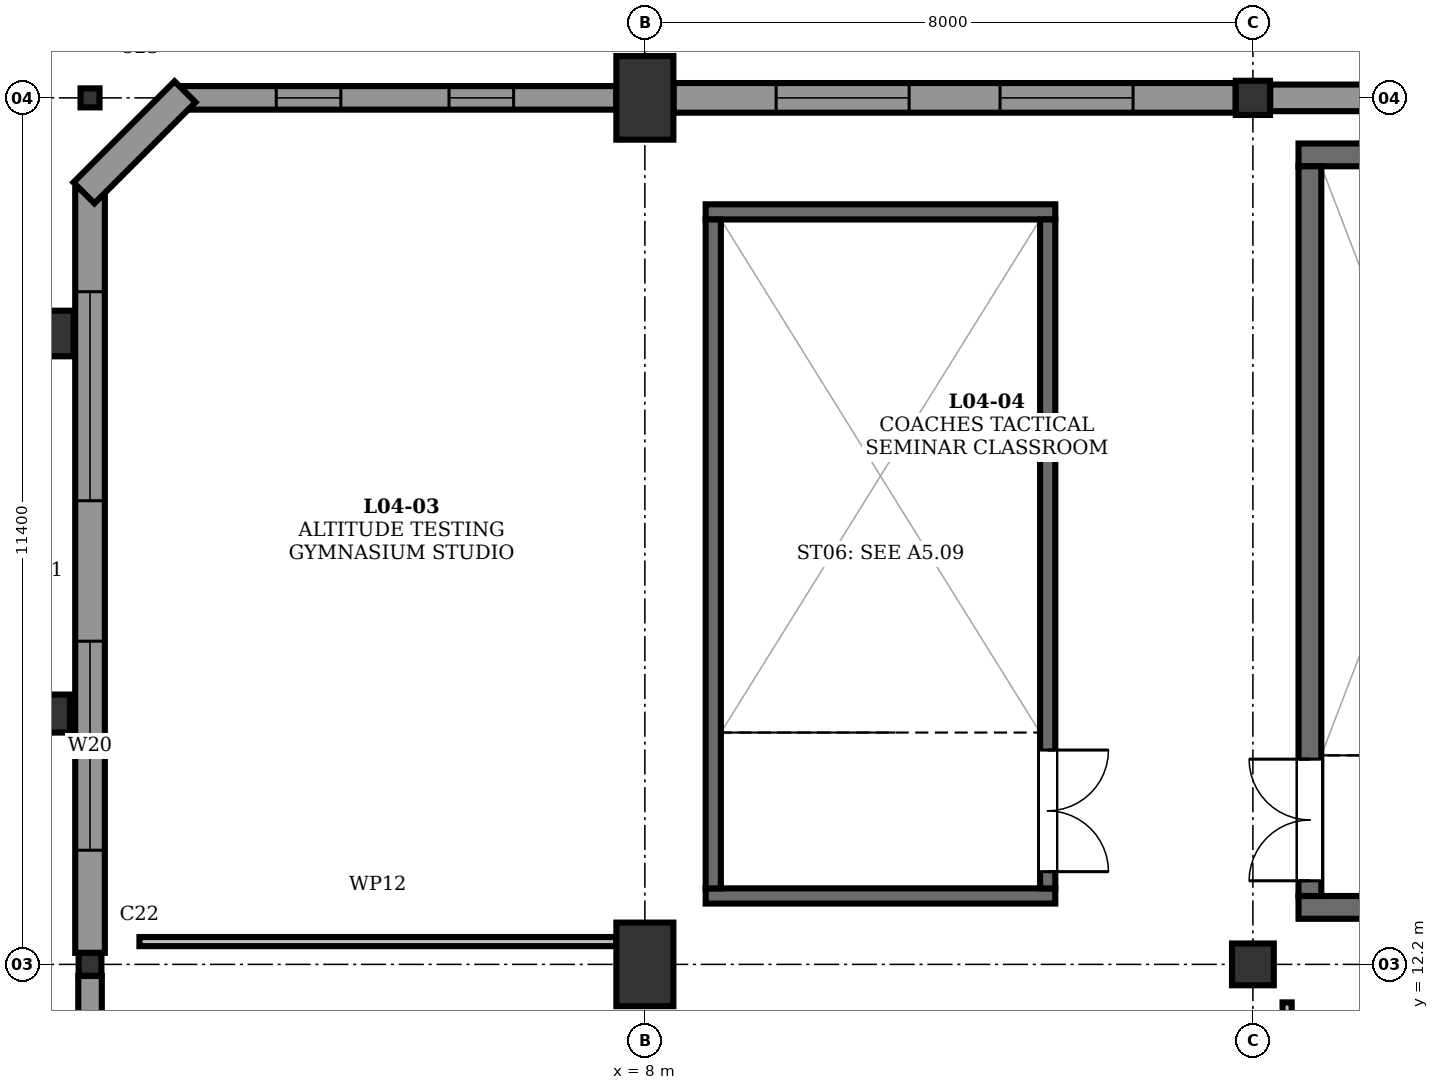
"""IFC4 building model, lengths in metres.
Left out: names, types, materials, properties, quantities, classifications, styles, units other than length and angle.
Written with IfcOpenShell. Run it as: python <this file> out.ifc"""

import sys

from ifc_helpers import new_model, si_unit, direction, frame, frame_2d, origin, origin_2d, place, context, subcontext, project, spatial, rectangle, hollow_rectangle, extrude, element, fill, save


model = new_model("IFC4")
c1 = context("Model", 3, precision=1e-05, world=origin(), true_north=direction((0.0, 1.0)))
c2 = subcontext(c1, "Body", "Model", "MODEL_VIEW")
j1 = project(units=[si_unit("LENGTHUNIT", "METRE"), si_unit("PLANEANGLEUNIT", "RADIAN")], contexts=[c1])
p1 = place(None, origin())
s1 = spatial("IfcSite", under=j1, at=p1, CompositionType="ELEMENT")
p2 = place(p1, origin())
s2 = spatial("IfcBuilding", under=s1, at=p2, CompositionType="ELEMENT")
p3 = place(p2, frame((0.0, 0.0, 19.2)))
s3 = spatial("IfcBuildingStorey", under=s2, at=p3, CompositionType="ELEMENT", Elevation=19.2)
p4 = place(p3, frame((0.7, 12.2, 0.0), z_axis=(0.0, 0.0, 1.0), x_axis=(1.0, 0.0, 0.0)))
e1 = element("IfcColumn", 1, at=p4, inside=s3, PredefinedType="COLUMN", context=c2, shape_type="SweptSolid", body=[
    extrude(hollow_rectangle(XDim=0.3, YDim=0.3, WallThickness=0.012, at=origin_2d()), origin(), (0.0, 0.0, 1.0), 4.8),
])
p5 = place(p3, frame((0.7, 23.6, 0.0), z_axis=(0.0, 0.0, 1.0), x_axis=(1.0, 0.0, 0.0)))
e2 = element("IfcColumn", 2, at=p5, inside=s3, PredefinedType="COLUMN", context=c2, shape_type="SweptSolid", body=[
    extrude(hollow_rectangle(XDim=0.25, YDim=0.25, WallThickness=0.012, at=origin_2d()), origin(), (0.0, 0.0, 1.0), 4.8),
])
for number, where, z_axis, x_axis in (
    (3, (8.0, 12.2, 0.0), (0.0, 0.0, 1.0), (1.0, 0.0, 0.0)),
    (4, (8.0, 23.6, 0.0), (0.0, 0.0, 1.0), (1.0, 0.0, 0.0)),
):
    element("IfcColumn", number, at=place(p3, frame(where, z_axis=z_axis, x_axis=x_axis)), inside=s3, PredefinedType="COLUMN", context=c2, shape_type="SweptSolid", body=[
        extrude(rectangle(XDim=0.75, YDim=1.1, at=origin_2d()), origin(), (0.0, 0.0, 1.0), 4.8),
    ])
p6 = place(p3, frame((16.0, 12.2, 0.0), z_axis=(0.0, 0.0, 1.0), x_axis=(1.0, 0.0, 0.0)))
e5 = element("IfcColumn", 5, at=p6, inside=s3, PredefinedType="COLUMN", context=c2, shape_type="SweptSolid", body=[
    extrude(rectangle(XDim=0.55, YDim=0.55, at=origin_2d()), origin(), (0.0, 0.0, 1.0), 4.8),
])
p7 = place(p3, frame((16.0, 23.6, 0.0), z_axis=(0.0, 0.0, 1.0), x_axis=(1.0, 0.0, 0.0)))
e6 = element("IfcColumn", 6, at=p7, inside=s3, PredefinedType="COLUMN", context=c2, shape_type="SweptSolid", body=[
    extrude(rectangle(XDim=0.45, YDim=0.45, at=origin_2d()), origin(), (0.0, 0.0, 1.0), 4.8),
])
p8 = place(p3, frame((0.26, 15.5, 0.0), z_axis=(0.0, 0.0, 1.0), x_axis=(1.0, 0.0, 0.0)))
e7 = element("IfcColumn", 7, at=p8, inside=s3, PredefinedType="PILASTER", context=c2, shape_type="SweptSolid", body=[
    extrude(rectangle(XDim=0.35, YDim=0.5, at=origin_2d()), origin(), (0.0, 0.0, 1.0), 5.65),
])
p9 = place(p3, frame((0.26, 20.5, 0.0), z_axis=(0.0, 0.0, 1.0), x_axis=(1.0, 0.0, 0.0)))
e8 = element("IfcColumn", 8, at=p9, inside=s3, PredefinedType="PILASTER", context=c2, shape_type="SweptSolid", body=[
    extrude(rectangle(XDim=0.45, YDim=0.6, at=origin_2d()), origin(), (0.0, 0.0, 1.0), 5.65),
])
p10 = place(p3, frame((0.7, 1.8, 0.0), z_axis=(0.0, 0.0, 1.0), x_axis=(0.0, 1.0, 0.0)))
e9 = element("IfcWall", 9, at=p10, inside=s3, PredefinedType="STANDARD", context=c2, shape_type="SweptSolid", body=[
    extrude(rectangle(XDim=10.248, YDim=0.31, at=frame_2d((5.124, 0.0))), origin(), (0.0, 0.0, 1.0), 3.645),
])
p11 = place(p10, frame((1.35, 0.0, 0.75)))
e10 = element("IfcOpeningElement", 10, at=p11, cuts=e9, PredefinedType="OPENING", context=c2, shape_type="SweptSolid", body=[
    extrude(rectangle(XDim=0.75, YDim=2.35, at=frame_2d((0.375, 1.175))), frame((0.0, 0.167, 0.0), z_axis=(0.0, -1.0, 0.0), x_axis=(1.0, 0.0, 0.0)), (0.0, 0.0, 1.0), 0.334),
])
p12 = place(p10, frame((4.749, 0.0, 0.75)))
e11 = element("IfcOpeningElement", 11, at=p12, cuts=e9, PredefinedType="OPENING", context=c2, shape_type="SweptSolid", body=[
    extrude(rectangle(XDim=0.75, YDim=2.35, at=frame_2d((0.375, 1.175))), frame((0.0, 0.167, 0.0), z_axis=(0.0, -1.0, 0.0), x_axis=(1.0, 0.0, 0.0)), (0.0, 0.0, 1.0), 0.334),
])
p13 = place(p10, frame((8.148, 0.0, 0.75)))
e12 = element("IfcOpeningElement", 12, at=p13, cuts=e9, PredefinedType="OPENING", context=c2, shape_type="SweptSolid", body=[
    extrude(rectangle(XDim=0.75, YDim=2.35, at=frame_2d((0.375, 1.175))), frame((0.0, 0.167, 0.0), z_axis=(0.0, -1.0, 0.0), x_axis=(1.0, 0.0, 0.0)), (0.0, 0.0, 1.0), 0.334),
])
p14 = place(p3, frame((0.7, 12.352, 0.0), z_axis=(0.0, 0.0, 1.0), x_axis=(0.0, 1.0, 0.0)))
e13 = element("IfcWall", 13, at=p14, inside=s3, PredefinedType="STANDARD", context=c2, shape_type="SweptSolid", body=[
    extrude(rectangle(XDim=10.048, YDim=0.39, at=frame_2d((5.024, 0.0))), origin(), (0.0, 0.0, 1.0), 3.645),
])
p15 = place(p14, frame((1.35, 0.0, 0.75)))
e14 = element("IfcOpeningElement", 14, at=p15, cuts=e13, PredefinedType="OPENING", context=c2, shape_type="SweptSolid", body=[
    extrude(rectangle(XDim=2.75, YDim=2.35, at=frame_2d((1.375, 1.175))), frame((0.0, 0.207, 0.0), z_axis=(0.0, -1.0, 0.0), x_axis=(1.0, 0.0, 0.0)), (0.0, 0.0, 1.0), 0.414),
])
p16 = place(p14, frame((5.948, 0.0, 0.75)))
e15 = element("IfcOpeningElement", 15, at=p16, cuts=e13, PredefinedType="OPENING", context=c2, shape_type="SweptSolid", body=[
    extrude(rectangle(XDim=2.75, YDim=2.35, at=frame_2d((1.375, 1.175))), frame((0.0, 0.207, 0.0), z_axis=(0.0, -1.0, 0.0), x_axis=(1.0, 0.0, 0.0)), (0.0, 0.0, 1.0), 0.414),
])
p17 = place(p3, frame((1.8, 23.6, 0.0), z_axis=(0.0, 0.0, 1.0), x_axis=(1.0, 0.0, 0.0)))
e16 = element("IfcWall", 16, at=p17, inside=s3, PredefinedType="STANDARD", context=c2, shape_type="SweptSolid", body=[
    extrude(rectangle(XDim=5.823, YDim=0.31, at=frame_2d((2.912, 0.0))), origin(), (0.0, 0.0, 1.0), 3.645),
])
p18 = place(p17, frame((1.35, 0.0, 0.75)))
e17 = element("IfcOpeningElement", 17, at=p18, cuts=e16, PredefinedType="OPENING", context=c2, shape_type="SweptSolid", body=[
    extrude(rectangle(XDim=0.85, YDim=1.75, at=frame_2d((0.425, 0.875))), frame((0.0, 0.167, 0.0), z_axis=(0.0, -1.0, 0.0), x_axis=(1.0, 0.0, 0.0)), (0.0, 0.0, 1.0), 0.334),
])
p19 = place(p17, frame((3.623, 0.0, 0.75)))
e18 = element("IfcOpeningElement", 18, at=p19, cuts=e16, PredefinedType="OPENING", context=c2, shape_type="SweptSolid", body=[
    extrude(rectangle(XDim=0.85, YDim=1.75, at=frame_2d((0.425, 0.875))), frame((0.0, 0.167, 0.0), z_axis=(0.0, -1.0, 0.0), x_axis=(1.0, 0.0, 0.0)), (0.0, 0.0, 1.0), 0.334),
])
p20 = place(p3, frame((8.377, 23.6, 0.0), z_axis=(0.0, 0.0, 1.0), x_axis=(1.0, 0.0, 0.0)))
e19 = element("IfcWall", 19, at=p20, inside=s3, PredefinedType="STANDARD", context=c2, shape_type="SweptSolid", body=[
    extrude(rectangle(XDim=7.396, YDim=0.39, at=frame_2d((3.698, 0.0))), origin(), (0.0, 0.0, 1.0), 3.645),
])
p21 = place(p20, frame((1.35, 0.0, 0.75)))
e20 = element("IfcOpeningElement", 20, at=p21, cuts=e19, PredefinedType="OPENING", context=c2, shape_type="SweptSolid", body=[
    extrude(rectangle(XDim=1.75, YDim=1.75, at=frame_2d((0.875, 0.875))), frame((0.0, 0.207, 0.0), z_axis=(0.0, -1.0, 0.0), x_axis=(1.0, 0.0, 0.0)), (0.0, 0.0, 1.0), 0.414),
])
p22 = place(p20, frame((4.296, 0.0, 0.75)))
e21 = element("IfcOpeningElement", 21, at=p22, cuts=e19, PredefinedType="OPENING", context=c2, shape_type="SweptSolid", body=[
    extrude(rectangle(XDim=1.75, YDim=1.75, at=frame_2d((0.875, 0.875))), frame((0.0, 0.207, 0.0), z_axis=(0.0, -1.0, 0.0), x_axis=(1.0, 0.0, 0.0)), (0.0, 0.0, 1.0), 0.414),
])
p23 = place(p3, frame((16.227, 23.6, 0.0), z_axis=(0.0, 0.0, 1.0), x_axis=(1.0, 0.0, 0.0)))
e22 = element("IfcWall", 22, at=p23, inside=s3, PredefinedType="STANDARD", context=c2, shape_type="SweptSolid", body=[
    extrude(rectangle(XDim=7.396, YDim=0.35, at=frame_2d((3.698, 0.0))), origin(), (0.0, 0.0, 1.0), 3.645),
])
p24 = place(p23, frame((1.35, 0.0, 0.75)))
e23 = element("IfcOpeningElement", 23, at=p24, cuts=e22, PredefinedType="OPENING", context=c2, shape_type="SweptSolid", body=[
    extrude(rectangle(XDim=0.9, YDim=2.05, at=frame_2d((0.45, 1.025))), frame((0.0, 0.187, 0.0), z_axis=(0.0, -1.0, 0.0), x_axis=(1.0, 0.0, 0.0)), (0.0, 0.0, 1.0), 0.374),
])
p25 = place(p23, frame((3.248, 0.0, 0.75)))
e24 = element("IfcOpeningElement", 24, at=p25, cuts=e22, PredefinedType="OPENING", context=c2, shape_type="SweptSolid", body=[
    extrude(rectangle(XDim=0.9, YDim=2.05, at=frame_2d((0.45, 1.025))), frame((0.0, 0.187, 0.0), z_axis=(0.0, -1.0, 0.0), x_axis=(1.0, 0.0, 0.0)), (0.0, 0.0, 1.0), 0.374),
])
p26 = place(p23, frame((5.146, 0.0, 0.75)))
e25 = element("IfcOpeningElement", 25, at=p26, cuts=e22, PredefinedType="OPENING", context=c2, shape_type="SweptSolid", body=[
    extrude(rectangle(XDim=0.9, YDim=2.05, at=frame_2d((0.45, 1.025))), frame((0.0, 0.187, 0.0), z_axis=(0.0, -1.0, 0.0), x_axis=(1.0, 0.0, 0.0)), (0.0, 0.0, 1.0), 0.374),
])
p27 = place(p3, frame((0.62, 22.35, 0.0), z_axis=(0.0, 0.0, 1.0), x_axis=(0.707106781187, 0.707106781187, 0.0)))
e26 = element("IfcWall", 26, at=p27, inside=s3, PredefinedType="STANDARD", context=c2, shape_type="SweptSolid", body=[
    extrude(rectangle(XDim=1.881, YDim=0.39, at=frame_2d((0.94, 0.0))), origin(), (0.0, 0.0, 1.0), 3.645),
])
for number, where, z_axis, x_axis in (
    (27, (16.6, 12.95, 0.0), (0.0, 0.0, 1.0), (1.0, 0.0, 0.0)),
    (28, (16.6, 22.85, 0.0), (0.0, 0.0, 1.0), (1.0, 0.0, 0.0)),
):
    element("IfcWall", number, at=place(p3, frame(where, z_axis=z_axis, x_axis=x_axis)), inside=s3, PredefinedType="SHEAR", context=c2, shape_type="SweptSolid", body=[
        extrude(rectangle(XDim=6.8, YDim=0.3, at=frame_2d((3.4, 0.0))), origin(), (0.0, 0.0, 1.0), 4.56),
    ])
p28 = place(p3, frame((16.75, 13.1, 0.0), z_axis=(0.0, 0.0, 1.0), x_axis=(0.0, 1.0, 0.0)))
e29 = element("IfcWall", 29, at=p28, inside=s3, PredefinedType="SHEAR", context=c2, shape_type="SweptSolid", body=[
    extrude(rectangle(XDim=9.6, YDim=0.3, at=frame_2d((4.8, 0.0))), origin(), (0.0, 0.0, 1.0), 4.56),
])
p29 = place(p28, frame((0.2, 0.0, 0.0)))
e30 = element("IfcOpeningElement", 30, at=p29, cuts=e29, PredefinedType="OPENING", context=c2, shape_type="SweptSolid", body=[
    extrude(rectangle(XDim=1.6, YDim=2.2, at=frame_2d((0.8, 1.1))), frame((0.0, 0.162, 0.0), z_axis=(0.0, -1.0, 0.0), x_axis=(1.0, 0.0, 0.0)), (0.0, 0.0, 1.0), 0.324),
])
for number, where, z_axis, x_axis in (
    (31, (8.8, 13.1, 0.0), (0.0, 0.0, 1.0), (1.0, 0.0, 0.0)),
    (32, (8.8, 22.1, 0.0), (0.0, 0.0, 1.0), (1.0, 0.0, 0.0)),
):
    element("IfcWall", number, at=place(p3, frame(where, z_axis=z_axis, x_axis=x_axis)), inside=s3, PredefinedType="SOLIDWALL", context=c2, shape_type="SweptSolid", body=[
        extrude(rectangle(XDim=4.6, YDim=0.2, at=frame_2d((2.3, 0.0))), origin(), (0.0, 0.0, 1.0), 4.56),
    ])
p30 = place(p3, frame((8.9, 13.2, 0.0), z_axis=(0.0, 0.0, 1.0), x_axis=(0.0, 1.0, 0.0)))
e33 = element("IfcWall", 33, at=p30, inside=s3, PredefinedType="SOLIDWALL", context=c2, shape_type="SweptSolid", body=[
    extrude(rectangle(XDim=8.8, YDim=0.2, at=frame_2d((4.4, 0.0))), origin(), (0.0, 0.0, 1.0), 4.56),
])
p31 = place(p3, frame((13.3, 13.2, 0.0), z_axis=(0.0, 0.0, 1.0), x_axis=(0.0, 1.0, 0.0)))
e34 = element("IfcWall", 34, at=p31, inside=s3, PredefinedType="SOLIDWALL", context=c2, shape_type="SweptSolid", body=[
    extrude(rectangle(XDim=8.8, YDim=0.2, at=frame_2d((4.4, 0.0))), origin(), (0.0, 0.0, 1.0), 4.56),
])
p32 = place(p31, frame((0.22, 0.0, 0.0)))
e35 = element("IfcOpeningElement", 35, at=p32, cuts=e34, PredefinedType="OPENING", context=c2, shape_type="SweptSolid", body=[
    extrude(rectangle(XDim=1.6, YDim=2.2, at=frame_2d((0.8, 1.1))), frame((0.0, 0.112, 0.0), z_axis=(0.0, -1.0, 0.0), x_axis=(1.0, 0.0, 0.0)), (0.0, 0.0, 1.0), 0.224),
])
p33 = place(p3, frame((16.45, 8.95, 0.0), z_axis=(0.0, 0.0, 1.0), x_axis=(0.0, 1.0, 0.0)))
e36 = element("IfcWall", 36, at=p33, inside=s3, PredefinedType="PARTITIONING", context=c2, shape_type="SweptSolid", body=[
    extrude(rectangle(XDim=2.75, YDim=0.12, at=frame_2d((1.375, 0.0))), origin(), (0.0, 0.0, 1.0), 3.845),
])
p34 = place(p33, frame((0.438, 0.0, 0.0)))
e37 = element("IfcOpeningElement", 37, at=p34, cuts=e36, PredefinedType="OPENING", context=c2, shape_type="SweptSolid", body=[
    extrude(rectangle(XDim=1.05, YDim=2.15, at=frame_2d((0.525, 1.075))), frame((0.0, 0.072, 0.0), z_axis=(0.0, -1.0, 0.0), x_axis=(1.0, 0.0, 0.0)), (0.0, 0.0, 1.0), 0.144),
])
p35 = place(p3, frame((1.35, 12.5, 0.0), z_axis=(0.0, 0.0, 1.0), x_axis=(1.0, 0.0, 0.0)))
e38 = element("IfcWall", 38, at=p35, inside=s3, PredefinedType="PARTITIONING", context=c2, shape_type="SweptSolid", body=[
    extrude(rectangle(XDim=6.273, YDim=0.12, at=frame_2d((3.136, 0.0))), origin(), (0.0, 0.0, 1.0), 3.645),
])
p36 = place(p15, origin())
e39 = element("IfcWindow", 39, at=p36, inside=s3, PartitioningType="TRIPLE_PANEL_VERTICAL", PredefinedType="WINDOW", context=c2, shape_type="SweptSolid", body=[
    extrude(rectangle(XDim=2.75, YDim=2.35, at=frame_2d((1.375, 1.175))), frame((0.0, 0.08, 0.0), z_axis=(0.0, -1.0, 0.0), x_axis=(1.0, 0.0, 0.0)), (0.0, 0.0, 1.0), 0.06),
])
fill(e14, e39)
p37 = place(p16, origin())
e40 = element("IfcWindow", 40, at=p37, inside=s3, PartitioningType="TRIPLE_PANEL_VERTICAL", PredefinedType="WINDOW", context=c2, shape_type="SweptSolid", body=[
    extrude(rectangle(XDim=2.75, YDim=2.35, at=frame_2d((1.375, 1.175))), frame((0.0, 0.08, 0.0), z_axis=(0.0, -1.0, 0.0), x_axis=(1.0, 0.0, 0.0)), (0.0, 0.0, 1.0), 0.06),
])
fill(e15, e40)
p38 = place(p18, origin())
e41 = element("IfcWindow", 41, at=p38, inside=s3, PartitioningType="SINGLE_PANEL", PredefinedType="WINDOW", context=c2, shape_type="SweptSolid", body=[
    extrude(rectangle(XDim=0.85, YDim=1.75, at=frame_2d((0.425, 0.875))), frame((0.0, 0.08, 0.0), z_axis=(0.0, -1.0, 0.0), x_axis=(1.0, 0.0, 0.0)), (0.0, 0.0, 1.0), 0.06),
])
fill(e17, e41)
p39 = place(p19, origin())
e42 = element("IfcWindow", 42, at=p39, inside=s3, PartitioningType="SINGLE_PANEL", PredefinedType="WINDOW", context=c2, shape_type="SweptSolid", body=[
    extrude(rectangle(XDim=0.85, YDim=1.75, at=frame_2d((0.425, 0.875))), frame((0.0, 0.08, 0.0), z_axis=(0.0, -1.0, 0.0), x_axis=(1.0, 0.0, 0.0)), (0.0, 0.0, 1.0), 0.06),
])
fill(e18, e42)
p40 = place(p21, origin())
e43 = element("IfcWindow", 43, at=p40, inside=s3, PartitioningType="DOUBLE_PANEL_VERTICAL", PredefinedType="WINDOW", context=c2, shape_type="SweptSolid", body=[
    extrude(rectangle(XDim=1.75, YDim=1.75, at=frame_2d((0.875, 0.875))), frame((0.0, 0.08, 0.0), z_axis=(0.0, -1.0, 0.0), x_axis=(1.0, 0.0, 0.0)), (0.0, 0.0, 1.0), 0.06),
])
fill(e20, e43)
p41 = place(p22, origin())
e44 = element("IfcWindow", 44, at=p41, inside=s3, PartitioningType="DOUBLE_PANEL_VERTICAL", PredefinedType="WINDOW", context=c2, shape_type="SweptSolid", body=[
    extrude(rectangle(XDim=1.75, YDim=1.75, at=frame_2d((0.875, 0.875))), frame((0.0, 0.08, 0.0), z_axis=(0.0, -1.0, 0.0), x_axis=(1.0, 0.0, 0.0)), (0.0, 0.0, 1.0), 0.06),
])
fill(e21, e44)
p42 = place(p2, frame((0.0, 0.0, 27.0)))
p43 = place(p42, frame((0.0, 0.0, -3.24)))
p44 = place(p43, frame((10.0, 18.0, 0.0)))
p45 = place(p44, frame((0.0, 0.0, 0.19)))
e45 = element("IfcWindow", 45, at=p45, inside=s3, PartitioningType="SINGLE_PANEL", PredefinedType="LIGHTDOME", context=c2, shape_type="SweptSolid", body=[
    extrude(rectangle(XDim=1.6, YDim=1.6, at=origin_2d()), origin(), (0.0, 0.0, 1.0), 0.05),
])
p46 = place(p29, origin())
e46 = element("IfcDoor", 46, at=p46, inside=s3, OperationType="DOUBLE_DOOR_SINGLE_SWING", PredefinedType="DOOR", context=c2, shape_type="SweptSolid", body=[
    extrude(rectangle(XDim=1.6, YDim=2.2, at=frame_2d((0.8, 1.1))), frame((0.0, 0.025, 0.0), z_axis=(0.0, -1.0, 0.0), x_axis=(1.0, 0.0, 0.0)), (0.0, 0.0, 1.0), 0.05),
])
fill(e30, e46)
p47 = place(p32, frame((1.6, 0.0, 0.0), z_axis=(0.0, 0.0, 1.0), x_axis=(-1.0, 0.0, 0.0)))
e47 = element("IfcDoor", 47, at=p47, inside=s3, OperationType="DOUBLE_DOOR_SINGLE_SWING", PredefinedType="DOOR", context=c2, shape_type="SweptSolid", body=[
    extrude(rectangle(XDim=1.6, YDim=2.2, at=frame_2d((0.8, 1.1))), frame((0.0, 0.025, 0.0), z_axis=(0.0, -1.0, 0.0), x_axis=(1.0, 0.0, 0.0)), (0.0, 0.0, 1.0), 0.05),
])
fill(e35, e47)
save(model, sys.argv[1])
